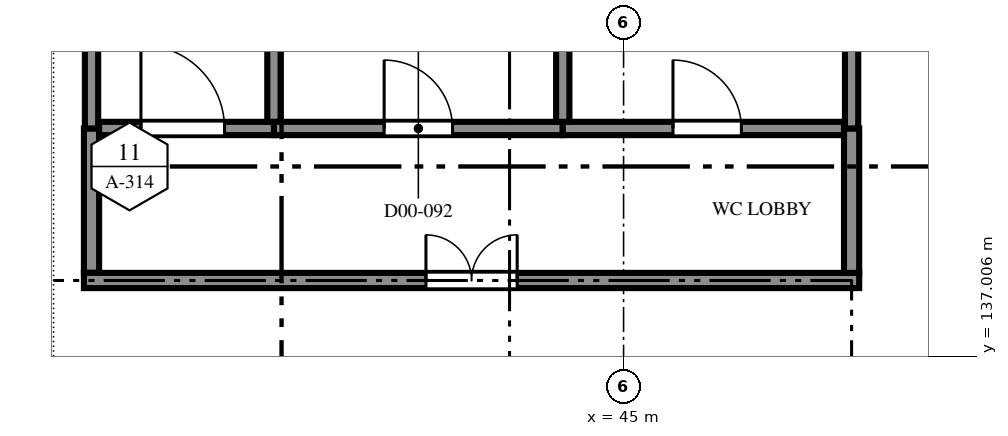
"""IFC4 building model, lengths in metres.
Left out: names, types, materials, properties, quantities, classifications, styles, units other than length and angle.
Written with IfcOpenShell. Run it as: python <this file> out.ifc"""

import sys

from ifc_helpers import new_model, si_unit, direction, frame, frame_2d, origin, place, context, subcontext, project, spatial, polyline, rectangle, outline, extrude, element, fill, save


model = new_model("IFC4")
c1 = context("Model", 3, precision=1e-05, world=origin(), true_north=direction((0.0, 1.0)))
c2 = subcontext(c1, "Body", "Model", "MODEL_VIEW")
j1 = project(units=[si_unit("LENGTHUNIT", "METRE"), si_unit("PLANEANGLEUNIT", "RADIAN")], contexts=[c1])
p1 = place(None, origin())
s1 = spatial("IfcSite", under=j1, at=p1, CompositionType="ELEMENT")
p2 = place(p1, origin())
s2 = spatial("IfcBuilding", under=s1, at=p2, CompositionType="ELEMENT")
p3 = place(p2, origin())
s3 = spatial("IfcBuildingStorey", under=s2, at=p3, CompositionType="ELEMENT", Elevation=0.0)
p4 = place(p3, frame((38.0, 140.0, 0.0), z_axis=(0.0, 0.0, 1.0), x_axis=(0.0, -1.0, 0.0)))
e1 = element("IfcWall", 1, at=p4, inside=s3, PredefinedType="PARTITIONING", context=c2, shape_type="SweptSolid", body=[
    extrude(rectangle(XDim=1.9, YDim=0.2, at=frame_2d((0.95, 0.0))), origin(), (0.0, 0.0, 1.0), 6.6),
])
p5 = place(p3, frame((37.9, 138.0, 0.0), z_axis=(0.0, 0.0, 1.0), x_axis=(1.0, 0.0, 0.0)))
e2 = element("IfcWall", 2, at=p5, inside=s3, PredefinedType="PARTITIONING", context=c2, shape_type="SweptSolid", body=[
    extrude(rectangle(XDim=10.2, YDim=0.2, at=frame_2d((5.1, 0.0))), origin(), (0.0, 0.0, 1.0), 6.6),
])
p6 = place(p5, frame((4.5, 0.0, 0.0)))
e3 = element("IfcOpeningElement", 3, at=p6, cuts=e2, PredefinedType="OPENING", context=c2, shape_type="SweptSolid", body=[
    extrude(rectangle(XDim=1.2, YDim=2.1, at=frame_2d((0.6, 1.05))), frame((0.0, 0.11, 0.0), z_axis=(0.0, -1.0, 0.0), x_axis=(1.0, 0.0, 0.0)), (0.0, 0.0, 1.0), 0.22),
])
p7 = place(p3, frame((48.0, 138.1, 0.0), z_axis=(0.0, 0.0, 1.0), x_axis=(0.0, 1.0, 0.0)))
e4 = element("IfcWall", 4, at=p7, inside=s3, PredefinedType="PARTITIONING", context=c2, shape_type="SweptSolid", body=[
    extrude(rectangle(XDim=1.9, YDim=0.2, at=frame_2d((0.95, 0.0))), origin(), (0.0, 0.0, 1.0), 6.6),
])
for number, where, z_axis, x_axis in (
    (5, (38.0, 144.0, 0.0), (0.0, 0.0, 1.0), (0.0, -1.0, 0.0)),
    (6, (48.0, 140.0, 0.0), (0.0, 0.0, 1.0), (0.0, 1.0, 0.0)),
):
    element("IfcWall", number, at=place(p3, frame(where, z_axis=z_axis, x_axis=x_axis)), inside=s3, PredefinedType="PARTITIONING", context=c2, shape_type="SweptSolid", body=[
        extrude(rectangle(XDim=4.0, YDim=0.175, at=frame_2d((2.0, 0.0))), origin(), (0.0, 0.0, 1.0), 6.459),
    ])
p8 = place(p3, frame((38.1, 140.0, 0.0), z_axis=(0.0, 0.0, 1.0), x_axis=(1.0, 0.0, 0.0)))
e7 = element("IfcWall", 7, at=p8, inside=s3, PredefinedType="PARTITIONING", context=c2, shape_type="SweptSolid", body=[
    extrude(rectangle(XDim=2.3, YDim=0.175, at=frame_2d((1.15, 0.0))), origin(), (0.0, 0.0, 1.0), 6.459),
])
p9 = place(p8, frame((0.55, 0.0, 0.0)))
e8 = element("IfcOpeningElement", 8, at=p9, cuts=e7, PredefinedType="OPENING", context=c2, shape_type="SweptSolid", body=[
    extrude(rectangle(XDim=1.1, YDim=2.1, at=frame_2d((0.55, 1.05))), frame((0.0, 0.097, 0.0), z_axis=(0.0, -1.0, 0.0), x_axis=(1.0, 0.0, 0.0)), (0.0, 0.0, 1.0), 0.195),
])
p10 = place(p3, frame((40.4, 140.0, 0.0), z_axis=(0.0, 0.0, 1.0), x_axis=(1.0, 0.0, 0.0)))
e9 = element("IfcWall", 9, at=p10, inside=s3, PredefinedType="PARTITIONING", context=c2, shape_type="SweptSolid", body=[
    extrude(rectangle(XDim=3.8, YDim=0.175, at=frame_2d((1.9, 0.0))), origin(), (0.0, 0.0, 1.0), 6.459),
])
p11 = place(p10, frame((1.45, 0.0, 0.0)))
e10 = element("IfcOpeningElement", 10, at=p11, cuts=e9, PredefinedType="OPENING", context=c2, shape_type="SweptSolid", body=[
    extrude(rectangle(XDim=0.9, YDim=2.1, at=frame_2d((0.45, 1.05))), frame((0.0, 0.097, 0.0), z_axis=(0.0, -1.0, 0.0), x_axis=(1.0, 0.0, 0.0)), (0.0, 0.0, 1.0), 0.195),
])
p12 = place(p3, frame((44.2, 140.0, 0.0), z_axis=(0.0, 0.0, 1.0), x_axis=(1.0, 0.0, 0.0)))
e11 = element("IfcWall", 11, at=p12, inside=s3, PredefinedType="PARTITIONING", context=c2, shape_type="SweptSolid", body=[
    extrude(rectangle(XDim=3.7, YDim=0.175, at=frame_2d((1.85, 0.0))), origin(), (0.0, 0.0, 1.0), 6.459),
])
p13 = place(p12, frame((1.45, 0.0, 0.0)))
e12 = element("IfcOpeningElement", 12, at=p13, cuts=e11, PredefinedType="OPENING", context=c2, shape_type="SweptSolid", body=[
    extrude(rectangle(XDim=0.9, YDim=2.1, at=frame_2d((0.45, 1.05))), frame((0.0, 0.097, 0.0), z_axis=(0.0, -1.0, 0.0), x_axis=(1.0, 0.0, 0.0)), (0.0, 0.0, 1.0), 0.195),
])
p14 = place(p3, frame((40.4, 144.0, 0.0), z_axis=(0.0, 0.0, 1.0), x_axis=(0.0, -1.0, 0.0)))
e13 = element("IfcWall", 13, at=p14, inside=s3, PredefinedType="PARTITIONING", context=c2, shape_type="SweptSolid", body=[
    extrude(rectangle(XDim=3.913, YDim=0.175, at=frame_2d((1.956, 0.0))), origin(), (0.0, 0.0, 1.0), 6.459),
])
p15 = place(p3, frame((44.2, 143.773, 0.0), z_axis=(0.0, 0.0, 1.0), x_axis=(0.0, -1.0, 0.0)))
e14 = element("IfcWall", 14, at=p15, inside=s3, PredefinedType="PARTITIONING", context=c2, shape_type="SweptSolid", body=[
    extrude(rectangle(XDim=3.686, YDim=0.175, at=frame_2d((1.843, 0.0))), origin(), (0.0, 0.0, 1.0), 6.459),
])
p16 = place(p6, origin())
e15 = element("IfcDoor", 15, at=p16, inside=s3, OperationType="DOUBLE_DOOR_SINGLE_SWING", PredefinedType="DOOR", context=c2, shape_type="SweptSolid", body=[
    extrude(outline(polyline([(0.0, 0.0), (0.07, 0.0), (0.07, 2.03), (1.13, 2.03), (1.13, 0.0), (1.2, 0.0), (1.2, 2.1), (0.0, 2.1), (0.0, 0.0)])), frame((0.0, 0.025, 0.0), z_axis=(0.0, -1.0, 0.0), x_axis=(1.0, 0.0, 0.0)), (0.0, 0.0, 1.0), 0.05),
    extrude(outline(polyline([(0.074, 0.01), (0.597, 0.01), (0.597, 2.026), (0.074, 2.026), (0.074, 0.01)]), holes=[polyline([(0.178, 0.373), (0.492, 0.373), (0.492, 1.784), (0.178, 1.784), (0.178, 0.373)])]), frame((0.0, 0.017, 0.0), z_axis=(0.0, -1.0, 0.0), x_axis=(1.0, 0.0, 0.0)), (0.0, 0.0, 1.0), 0.035),
    extrude(rectangle(XDim=0.314, YDim=1.411, at=frame_2d((0.335, 1.079))), frame((0.0, 0.009, 0.0), z_axis=(0.0, -1.0, 0.0), x_axis=(1.0, 0.0, 0.0)), (0.0, 0.0, 1.0), 0.017),
    extrude(outline(polyline([(0.603, 0.01), (1.126, 0.01), (1.126, 2.026), (0.603, 2.026), (0.603, 0.01)]), holes=[polyline([(0.708, 0.373), (1.021, 0.373), (1.021, 1.784), (0.708, 1.784), (0.708, 0.373)])]), frame((0.0, 0.017, 0.0), z_axis=(0.0, -1.0, 0.0), x_axis=(1.0, 0.0, 0.0)), (0.0, 0.0, 1.0), 0.035),
    extrude(rectangle(XDim=0.314, YDim=1.411, at=frame_2d((0.865, 1.079))), frame((0.0, 0.009, 0.0), z_axis=(0.0, -1.0, 0.0), x_axis=(1.0, 0.0, 0.0)), (0.0, 0.0, 1.0), 0.017),
])
fill(e3, e15)
p17 = place(p9, origin())
e16 = element("IfcDoor", 16, at=p17, inside=s3, OperationType="SINGLE_SWING_LEFT", PredefinedType="DOOR", context=c2, shape_type="SweptSolid", body=[
    extrude(outline(polyline([(0.0, 0.0), (0.07, 0.0), (0.07, 2.03), (1.03, 2.03), (1.03, 0.0), (1.1, 0.0), (1.1, 2.1), (0.0, 2.1), (0.0, 0.0)])), frame((0.0, 0.025, 0.0), z_axis=(0.0, -1.0, 0.0), x_axis=(1.0, 0.0, 0.0)), (0.0, 0.0, 1.0), 0.05),
    extrude(outline(polyline([(0.074, 0.01), (1.026, 0.01), (1.026, 2.026), (0.074, 2.026), (0.074, 0.01)]), holes=[polyline([(0.194, 0.16), (0.906, 0.16), (0.906, 1.01), (0.194, 1.01), (0.194, 0.16)]), polyline([(0.4, 1.16), (0.7, 1.16), (0.7, 1.76), (0.4, 1.76), (0.4, 1.16)])]), frame((0.0, 0.017, 0.0), z_axis=(0.0, -1.0, 0.0), x_axis=(1.0, 0.0, 0.0)), (0.0, 0.0, 1.0), 0.035),
    extrude(rectangle(XDim=0.712, YDim=0.85, at=frame_2d((0.55, 0.585))), frame((0.0, 0.009, 0.0), z_axis=(0.0, -1.0, 0.0), x_axis=(1.0, 0.0, 0.0)), (0.0, 0.0, 1.0), 0.017),
    extrude(rectangle(XDim=0.3, YDim=0.6, at=frame_2d((0.55, 1.46))), frame((0.0, 0.006, 0.0), z_axis=(0.0, -1.0, 0.0), x_axis=(1.0, 0.0, 0.0)), (0.0, 0.0, 1.0), 0.012),
])
fill(e8, e16)
p18 = place(p11, origin())
e17 = element("IfcDoor", 17, at=p18, inside=s3, OperationType="SINGLE_SWING_LEFT", PredefinedType="DOOR", context=c2, shape_type="SweptSolid", body=[
    extrude(outline(polyline([(0.0, 0.0), (0.07, 0.0), (0.07, 2.03), (0.83, 2.03), (0.83, 0.0), (0.9, 0.0), (0.9, 2.1), (0.0, 2.1), (0.0, 0.0)])), frame((0.0, 0.025, 0.0), z_axis=(0.0, -1.0, 0.0), x_axis=(1.0, 0.0, 0.0)), (0.0, 0.0, 1.0), 0.05),
    extrude(outline(polyline([(0.074, 0.01), (0.826, 0.01), (0.826, 2.026), (0.074, 2.026), (0.074, 0.01)]), holes=[polyline([(0.194, 0.16), (0.706, 0.16), (0.706, 1.01), (0.194, 1.01), (0.194, 0.16)]), polyline([(0.3, 1.16), (0.6, 1.16), (0.6, 1.76), (0.3, 1.76), (0.3, 1.16)])]), frame((0.0, 0.017, 0.0), z_axis=(0.0, -1.0, 0.0), x_axis=(1.0, 0.0, 0.0)), (0.0, 0.0, 1.0), 0.035),
    extrude(rectangle(XDim=0.512, YDim=0.85, at=frame_2d((0.45, 0.585))), frame((0.0, 0.009, 0.0), z_axis=(0.0, -1.0, 0.0), x_axis=(1.0, 0.0, 0.0)), (0.0, 0.0, 1.0), 0.017),
    extrude(rectangle(XDim=0.3, YDim=0.6, at=frame_2d((0.45, 1.46))), frame((0.0, 0.006, 0.0), z_axis=(0.0, -1.0, 0.0), x_axis=(1.0, 0.0, 0.0)), (0.0, 0.0, 1.0), 0.012),
])
fill(e10, e17)
p19 = place(p13, origin())
e18 = element("IfcDoor", 18, at=p19, inside=s3, OperationType="SINGLE_SWING_LEFT", PredefinedType="DOOR", context=c2, shape_type="SweptSolid", body=[
    extrude(outline(polyline([(0.0, 0.0), (0.07, 0.0), (0.07, 2.03), (0.83, 2.03), (0.83, 0.0), (0.9, 0.0), (0.9, 2.1), (0.0, 2.1), (0.0, 0.0)])), frame((0.0, 0.025, 0.0), z_axis=(0.0, -1.0, 0.0), x_axis=(1.0, 0.0, 0.0)), (0.0, 0.0, 1.0), 0.05),
    extrude(outline(polyline([(0.074, 0.01), (0.826, 0.01), (0.826, 2.026), (0.074, 2.026), (0.074, 0.01)]), holes=[polyline([(0.194, 0.16), (0.706, 0.16), (0.706, 1.01), (0.194, 1.01), (0.194, 0.16)]), polyline([(0.3, 1.16), (0.6, 1.16), (0.6, 1.76), (0.3, 1.76), (0.3, 1.16)])]), frame((0.0, 0.017, 0.0), z_axis=(0.0, -1.0, 0.0), x_axis=(1.0, 0.0, 0.0)), (0.0, 0.0, 1.0), 0.035),
    extrude(rectangle(XDim=0.512, YDim=0.85, at=frame_2d((0.45, 0.585))), frame((0.0, 0.009, 0.0), z_axis=(0.0, -1.0, 0.0), x_axis=(1.0, 0.0, 0.0)), (0.0, 0.0, 1.0), 0.017),
    extrude(rectangle(XDim=0.3, YDim=0.6, at=frame_2d((0.45, 1.46))), frame((0.0, 0.006, 0.0), z_axis=(0.0, -1.0, 0.0), x_axis=(1.0, 0.0, 0.0)), (0.0, 0.0, 1.0), 0.012),
])
fill(e12, e18)
save(model, sys.argv[1])
